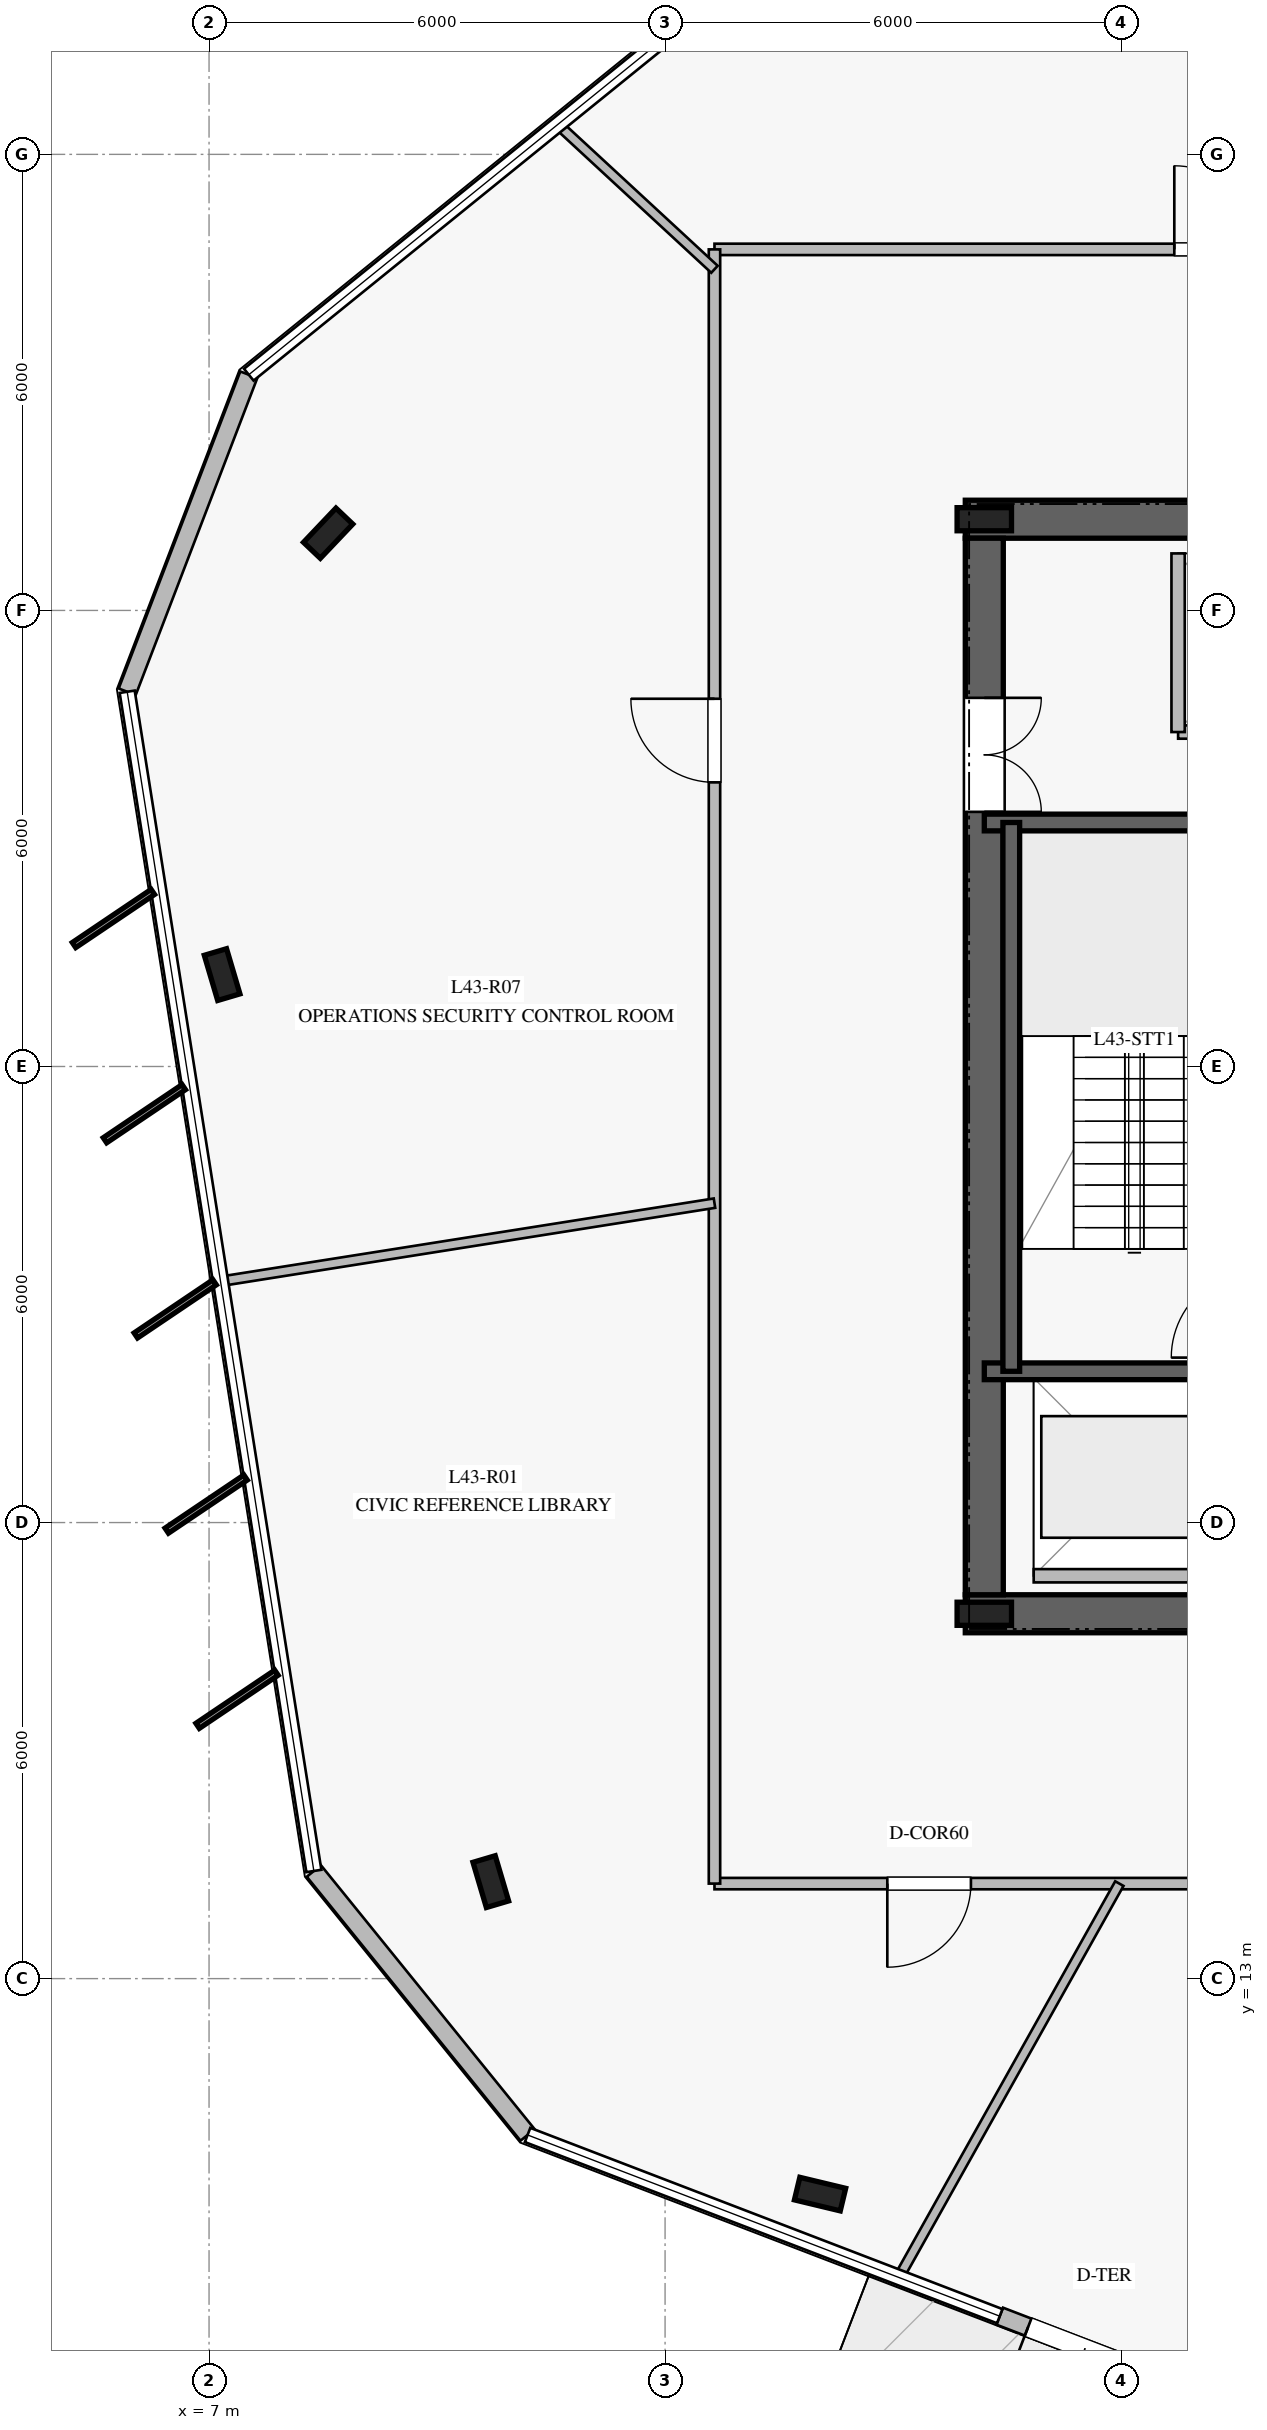
"""IFC4 building model, lengths in metres.
Left out: names, types, materials, properties, quantities, classifications, styles, units other than length and angle.
Written with IfcOpenShell. Run it as: python <this file> out.ifc"""

import sys

from ifc_helpers import new_model, si_unit, direction, frame, frame_2d, origin, origin_2d, place, context, subcontext, project, spatial, rectangle, i_section, extrude, element, fill, save


model = new_model("IFC4")
c1 = context("Model", 3, precision=1e-05, world=origin(), true_north=direction((0.0, 1.0)))
c2 = subcontext(c1, "Body", "Model", "MODEL_VIEW")
j1 = project(units=[si_unit("LENGTHUNIT", "METRE"), si_unit("PLANEANGLEUNIT", "RADIAN")], contexts=[c1])
p1 = place(None, origin())
s1 = spatial("IfcSite", under=j1, at=p1, CompositionType="ELEMENT")
p2 = place(p1, origin())
s2 = spatial("IfcBuilding", under=s1, at=p2, CompositionType="ELEMENT")
p3 = place(p2, frame((0.0, 0.0, 180.8)))
s3 = spatial("IfcBuildingStorey", under=s2, at=p3, CompositionType="ELEMENT", Elevation=180.8)
p4 = place(p3, frame((16.95, 17.8, 0.0), z_axis=(0.0, 0.0, 1.0), x_axis=(1.0, 0.0, 0.0)))
e1 = element("IfcWall", 1, at=p4, inside=s3, PredefinedType="SHEAR", context=c2, shape_type="SweptSolid", body=[
    extrude(rectangle(XDim=16.1, YDim=0.5, at=frame_2d((8.05, 0.0))), origin(), (0.0, 0.0, 1.0), 3.78),
])
p5 = place(p4, frame((5.0, 0.0, 0.0)))
e2 = element("IfcOpeningElement", 2, at=p5, cuts=e1, PredefinedType="OPENING", context=c2, shape_type="SweptSolid", body=[
    extrude(rectangle(XDim=1.2, YDim=2.25, at=frame_2d((0.6, 1.125))), frame((0.0, 0.26, 0.0), z_axis=(0.0, -1.0, 0.0), x_axis=(1.0, 0.0, 0.0)), (0.0, 0.0, 1.0), 0.52),
])
p6 = place(p4, frame((13.95, 0.0, 0.0)))
e3 = element("IfcOpeningElement", 3, at=p6, cuts=e1, PredefinedType="OPENING", context=c2, shape_type="SweptSolid", body=[
    extrude(rectangle(XDim=0.9, YDim=2.1, at=frame_2d((0.45, 1.05))), frame((0.0, 0.26, 0.0), z_axis=(0.0, -1.0, 0.0), x_axis=(1.0, 0.0, 0.0)), (0.0, 0.0, 1.0), 0.52),
])
p7 = place(p4, frame((9.2, 0.0, 0.0)))
e4 = element("IfcOpeningElement", 4, at=p7, cuts=e1, PredefinedType="OPENING", context=c2, shape_type="SweptSolid", body=[
    extrude(rectangle(XDim=1.1, YDim=2.2, at=frame_2d((0.55, 1.1))), frame((0.0, 0.26, 0.0), z_axis=(0.0, -1.0, 0.0), x_axis=(1.0, 0.0, 0.0)), (0.0, 0.0, 1.0), 0.52),
])
p8 = place(p3, frame((33.05, 32.2, 0.0), z_axis=(0.0, 0.0, 1.0), x_axis=(-1.0, 0.0, 0.0)))
e5 = element("IfcWall", 5, at=p8, inside=s3, PredefinedType="SHEAR", context=c2, shape_type="SweptSolid", body=[
    extrude(rectangle(XDim=16.1, YDim=0.5, at=frame_2d((8.05, 0.0))), origin(), (0.0, 0.0, 1.0), 3.78),
])
p9 = place(p8, frame((5.0, 0.0, 0.0)))
e6 = element("IfcOpeningElement", 6, at=p9, cuts=e5, PredefinedType="OPENING", context=c2, shape_type="SweptSolid", body=[
    extrude(rectangle(XDim=1.2, YDim=2.25, at=frame_2d((0.6, 1.125))), frame((0.0, 0.26, 0.0), z_axis=(0.0, -1.0, 0.0), x_axis=(1.0, 0.0, 0.0)), (0.0, 0.0, 1.0), 0.52),
])
p10 = place(p3, frame((17.2, 31.95, 0.0), z_axis=(0.0, 0.0, 1.0), x_axis=(0.0, -1.0, 0.0)))
e7 = element("IfcWall", 7, at=p10, inside=s3, PredefinedType="SHEAR", context=c2, shape_type="SweptSolid", body=[
    extrude(rectangle(XDim=13.9, YDim=0.5, at=frame_2d((6.95, 0.0))), origin(), (0.0, 0.0, 1.0), 3.78),
])
p11 = place(p10, frame((2.1, 0.0, 0.0)))
e8 = element("IfcOpeningElement", 8, at=p11, cuts=e7, PredefinedType="OPENING", context=c2, shape_type="SweptSolid", body=[
    extrude(rectangle(XDim=1.5, YDim=2.2, at=frame_2d((0.75, 1.1))), frame((0.0, 0.26, 0.0), z_axis=(0.0, -1.0, 0.0), x_axis=(1.0, 0.0, 0.0)), (0.0, 0.0, 1.0), 0.52),
])
for number, where, z_axis, x_axis in (
    (9, (17.2, 17.8, 0.0), (0.0, 0.0, 1.0), (1.0, 0.0, 0.0)),
    (10, (17.2, 32.2, 0.0), (0.0, 0.0, 1.0), (1.0, 0.0, 0.0)),
):
    element("IfcColumn", number, at=place(p3, frame(where, z_axis=z_axis, x_axis=x_axis)), inside=s3, PredefinedType="COLUMN", context=c2, shape_type="SweptSolid", body=[
        extrude(i_section(OverallWidth=0.304, OverallDepth=0.716, WebThickness=0.021, FlangeThickness=0.04, at=origin_2d()), origin(), (0.0, 0.0, 1.0), 4.0),
    ])
for number, where, z_axis, x_axis in (
    (11, (17.2, 20.99, 0.0), (0.0, 0.0, 1.0), (1.0, 0.0, 0.0)),
    (12, (17.2, 28.21, 0.0), (0.0, 0.0, 1.0), (1.0, 0.0, 0.0)),
):
    element("IfcWall", number, at=place(p3, frame(where, z_axis=z_axis, x_axis=x_axis)), inside=s3, PredefinedType="SOLIDWALL", context=c2, shape_type="SweptSolid", body=[
        extrude(rectangle(XDim=3.72, YDim=0.22, at=frame_2d((1.86, 0.0))), origin(), (0.0, 0.0, 1.0), 3.78),
    ])
p12 = place(p3, frame((17.555, 28.21, 0.0), z_axis=(0.0, 0.0, 1.0), x_axis=(0.0, -1.0, 0.0)))
e13 = element("IfcWall", 13, at=p12, inside=s3, PredefinedType="SOLIDWALL", context=c2, shape_type="SweptSolid", body=[
    extrude(rectangle(XDim=7.22, YDim=0.22, at=frame_2d((3.61, 0.0))), origin(), (0.0, 0.0, 1.0), 3.78),
])
for number, where, z_axis, x_axis in (
    (14, (8.567, 32.016, 0.0), (0.0, 0.0, 1.0), (0.688, 0.725, 0.0)),
    (15, (7.172, 26.209, 0.0), (0.0, 0.0, 1.0), (-0.284, 0.959, 0.0)),
    (16, (10.707, 14.276, 0.0), (0.0, 0.0, 1.0), (-0.284, 0.959, 0.0)),
    (17, (15.039, 10.165, 0.0), (0.0, 0.0, 1.0), (-0.972, 0.233, 0.0)),
):
    element("IfcColumn", number, at=place(p3, frame(where, z_axis=z_axis, x_axis=x_axis)), inside=s3, PredefinedType="COLUMN", context=c2, shape_type="SweptSolid", body=[
        extrude(i_section(OverallWidth=0.305, OverallDepth=0.62, WebThickness=0.021, FlangeThickness=0.04, at=origin_2d()), origin(), (0.0, 0.0, 1.0), 4.0),
    ])
p13 = place(p3, frame((7.523, 34.101, 0.0), z_axis=(0.0, 0.0, 1.0), x_axis=(-0.358114682982, -0.933677607011, 0.0)))
e18 = element("IfcWall", 18, at=p13, inside=s3, PredefinedType="STANDARD", context=c2, shape_type="SweptSolid", body=[
    extrude(rectangle(XDim=4.468, YDim=0.24, at=frame_2d((2.234, 0.0))), origin(), (0.0, 0.0, 1.0), 3.78),
])
p14 = place(p3, frame((8.379, 14.416, 0.0), z_axis=(0.0, 0.0, 1.0), x_axis=(0.629281524136, -0.777177433654, 0.0)))
e19 = element("IfcWall", 19, at=p14, inside=s3, PredefinedType="STANDARD", context=c2, shape_type="SweptSolid", body=[
    extrude(rectangle(XDim=4.469, YDim=0.24, at=frame_2d((2.234, 0.0))), origin(), (0.0, 0.0, 1.0), 3.78),
])
p15 = place(p3, frame((17.403, 8.559, 0.0), z_axis=(0.0, 0.0, 1.0), x_axis=(0.933544764029, -0.358460839638, 0.0)))
e20 = element("IfcWall", 20, at=p15, inside=s3, PredefinedType="STANDARD", context=c2, shape_type="SweptSolid", body=[
    extrude(rectangle(XDim=2.399, YDim=0.24, at=frame_2d((1.2, 0.0))), origin(), (0.0, 0.0, 1.0), 3.78),
])
p16 = place(p15, frame((0.4, 0.0, 0.0)))
e21 = element("IfcOpeningElement", 21, at=p16, cuts=e20, PredefinedType="OPENING", context=c2, shape_type="SweptSolid", body=[
    extrude(rectangle(XDim=1.6, YDim=2.25, at=frame_2d((0.8, 1.125))), frame((0.0, 0.13, 0.0), z_axis=(0.0, -1.0, 0.0), x_axis=(1.0, 0.0, 0.0)), (0.0, 0.0, 1.0), 0.26),
])
p17 = place(p3, frame((19.75, 29.4, 0.0), z_axis=(0.0, 0.0, 1.0), x_axis=(1.0, 0.0, 0.0)))
e22 = element("IfcWall", 22, at=p17, inside=s3, PredefinedType="PARTITIONING", context=c2, shape_type="SweptSolid", body=[
    extrude(rectangle(XDim=1.9, YDim=0.175, at=frame_2d((0.95, 0.0))), origin(), (0.0, 0.0, 1.0), 3.78),
])
p18 = place(p3, frame((19.75, 29.4, 0.0), z_axis=(0.0, 0.0, 1.0), x_axis=(0.0, 1.0, 0.0)))
e23 = element("IfcWall", 23, at=p18, inside=s3, PredefinedType="PARTITIONING", context=c2, shape_type="SweptSolid", body=[
    extrude(rectangle(XDim=2.35, YDim=0.175, at=frame_2d((1.175, 0.0))), origin(), (0.0, 0.0, 1.0), 3.78),
])
p19 = place(p3, frame((17.85, 18.3, 0.0), z_axis=(0.0, 0.0, 1.0), x_axis=(1.0, 0.0, 0.0)))
e24 = element("IfcWall", 24, at=p19, inside=s3, PredefinedType="PARTITIONING", context=c2, shape_type="SweptSolid", body=[
    extrude(rectangle(XDim=2.6, YDim=0.175, at=frame_2d((1.3, 0.0))), origin(), (0.0, 0.0, 1.0), 3.78),
])
p20 = place(p3, frame((13.65, 35.75, 0.0), z_axis=(0.0, 0.0, 1.0), x_axis=(1.0, 0.0, 0.0)))
e25 = element("IfcWall", 25, at=p20, inside=s3, PredefinedType="PARTITIONING", context=c2, shape_type="SweptSolid", body=[
    extrude(rectangle(XDim=22.7, YDim=0.15, at=frame_2d((11.35, 0.0))), origin(), (0.0, 0.0, 1.0), 3.05),
])
p21 = place(p20, frame((16.871, 0.0, 0.0)))
e26 = element("IfcOpeningElement", 26, at=p21, cuts=e25, PredefinedType="OPENING", context=c2, shape_type="SweptSolid", body=[
    extrude(rectangle(XDim=1.1, YDim=2.2, at=frame_2d((0.55, 1.1))), frame((0.0, 0.085, 0.0), z_axis=(0.0, -1.0, 0.0), x_axis=(1.0, 0.0, 0.0)), (0.0, 0.0, 1.0), 0.17),
])
p22 = place(p20, frame((6.05, 0.0, 0.0)))
e27 = element("IfcOpeningElement", 27, at=p22, cuts=e25, PredefinedType="OPENING", context=c2, shape_type="SweptSolid", body=[
    extrude(rectangle(XDim=1.1, YDim=2.2, at=frame_2d((0.55, 1.1))), frame((0.0, 0.085, 0.0), z_axis=(0.0, -1.0, 0.0), x_axis=(1.0, 0.0, 0.0)), (0.0, 0.0, 1.0), 0.17),
])
p23 = place(p3, frame((36.35, 14.25, 0.0), z_axis=(0.0, 0.0, 1.0), x_axis=(-1.0, 0.0, 0.0)))
e28 = element("IfcWall", 28, at=p23, inside=s3, PredefinedType="PARTITIONING", context=c2, shape_type="SweptSolid", body=[
    extrude(rectangle(XDim=22.7, YDim=0.15, at=frame_2d((11.35, 0.0))), origin(), (0.0, 0.0, 1.0), 3.05),
])
p24 = place(p23, frame((19.326, 0.0, 0.0)))
e29 = element("IfcOpeningElement", 29, at=p24, cuts=e28, PredefinedType="OPENING", context=c2, shape_type="SweptSolid", body=[
    extrude(rectangle(XDim=1.1, YDim=2.2, at=frame_2d((0.55, 1.1))), frame((0.0, 0.085, 0.0), z_axis=(0.0, -1.0, 0.0), x_axis=(1.0, 0.0, 0.0)), (0.0, 0.0, 1.0), 0.17),
])
p25 = place(p23, frame((10.613, 0.0, 0.0)))
e30 = element("IfcOpeningElement", 30, at=p25, cuts=e28, PredefinedType="OPENING", context=c2, shape_type="SweptSolid", body=[
    extrude(rectangle(XDim=1.1, YDim=2.2, at=frame_2d((0.55, 1.1))), frame((0.0, 0.085, 0.0), z_axis=(0.0, -1.0, 0.0), x_axis=(1.0, 0.0, 0.0)), (0.0, 0.0, 1.0), 0.17),
])
p26 = place(p3, frame((13.65, 14.25, 0.0), z_axis=(0.0, 0.0, 1.0), x_axis=(0.0, 1.0, 0.0)))
e31 = element("IfcWall", 31, at=p26, inside=s3, PredefinedType="PARTITIONING", context=c2, shape_type="SweptSolid", body=[
    extrude(rectangle(XDim=21.5, YDim=0.15, at=frame_2d((10.75, 0.0))), origin(), (0.0, 0.0, 1.0), 3.02),
])
p27 = place(p26, frame((14.488, 0.0, 0.0)))
e32 = element("IfcOpeningElement", 32, at=p27, cuts=e31, PredefinedType="OPENING", context=c2, shape_type="SweptSolid", body=[
    extrude(rectangle(XDim=1.1, YDim=2.2, at=frame_2d((0.55, 1.1))), frame((0.0, 0.085, 0.0), z_axis=(0.0, -1.0, 0.0), x_axis=(1.0, 0.0, 0.0)), (0.0, 0.0, 1.0), 0.17),
])
p28 = place(p3, frame((13.65, 35.488, 0.0), z_axis=(0.0, 0.0, 1.0), x_axis=(-0.7343000475, 0.678825043911, 0.0)))
e33 = element("IfcWall", 33, at=p28, inside=s3, PredefinedType="PARTITIONING", context=c2, shape_type="SweptSolid", body=[
    extrude(rectangle(XDim=2.79, YDim=0.125, at=frame_2d((1.395, 0.0))), origin(), (0.0, 0.0, 1.0), 3.18),
])
p29 = place(p3, frame((13.65, 23.202, 0.0), z_axis=(0.0, 0.0, 1.0), x_axis=(-0.987709828036, -0.156298738322, 0.0)))
e34 = element("IfcWall", 34, at=p29, inside=s3, PredefinedType="PARTITIONING", context=c2, shape_type="SweptSolid", body=[
    extrude(rectangle(XDim=6.563, YDim=0.125, at=frame_2d((3.282, 0.0))), origin(), (0.0, 0.0, 1.0), 3.02),
])
p30 = place(p3, frame((18.977, 14.25, 0.0), z_axis=(0.0, 0.0, 1.0), x_axis=(-0.488671153829, -0.872468052948, 0.0)))
e35 = element("IfcWall", 35, at=p30, inside=s3, PredefinedType="PARTITIONING", context=c2, shape_type="SweptSolid", body=[
    extrude(rectangle(XDim=5.922, YDim=0.125, at=frame_2d((2.961, 0.0))), origin(), (0.0, 0.0, 1.0), 3.05),
])
p31 = place(p16, frame((1.6, 0.0, 0.0), z_axis=(0.0, 0.0, 1.0), x_axis=(-1.0, 0.0, 0.0)))
e36 = element("IfcDoor", 36, at=p31, inside=s3, OperationType="DOUBLE_DOOR_SINGLE_SWING", PredefinedType="DOOR", context=c2, shape_type="SweptSolid", body=[
    extrude(rectangle(XDim=1.6, YDim=2.25, at=frame_2d((0.8, 1.125))), frame((0.0, 0.025, 0.0), z_axis=(0.0, -1.0, 0.0), x_axis=(1.0, 0.0, 0.0)), (0.0, 0.0, 1.0), 0.05),
])
fill(e21, e36)
p32 = place(p11, origin())
e37 = element("IfcDoor", 37, at=p32, inside=s3, OperationType="DOUBLE_DOOR_SINGLE_SWING", PredefinedType="DOOR", context=c2, shape_type="SweptSolid", body=[
    extrude(rectangle(XDim=1.5, YDim=2.2, at=frame_2d((0.75, 1.1))), frame((0.0, 0.025, 0.0), z_axis=(0.0, -1.0, 0.0), x_axis=(1.0, 0.0, 0.0)), (0.0, 0.0, 1.0), 0.05),
])
fill(e8, e37)
p33 = place(p24, origin())
e38 = element("IfcDoor", 38, at=p33, inside=s3, OperationType="SINGLE_SWING_RIGHT", PredefinedType="DOOR", context=c2, shape_type="SweptSolid", body=[
    extrude(rectangle(XDim=1.1, YDim=2.2, at=frame_2d((0.55, 1.1))), frame((0.0, 0.025, 0.0), z_axis=(0.0, -1.0, 0.0), x_axis=(1.0, 0.0, 0.0)), (0.0, 0.0, 1.0), 0.05),
])
fill(e29, e38)
p34 = place(p22, origin())
e39 = element("IfcDoor", 39, at=p34, inside=s3, OperationType="SINGLE_SWING_LEFT", PredefinedType="DOOR", context=c2, shape_type="SweptSolid", body=[
    extrude(rectangle(XDim=1.1, YDim=2.2, at=frame_2d((0.55, 1.1))), frame((0.0, 0.025, 0.0), z_axis=(0.0, -1.0, 0.0), x_axis=(1.0, 0.0, 0.0)), (0.0, 0.0, 1.0), 0.05),
])
fill(e27, e39)
p35 = place(p27, origin())
e40 = element("IfcDoor", 40, at=p35, inside=s3, OperationType="SINGLE_SWING_RIGHT", PredefinedType="DOOR", context=c2, shape_type="SweptSolid", body=[
    extrude(rectangle(XDim=1.1, YDim=2.2, at=frame_2d((0.55, 1.1))), frame((0.0, 0.025, 0.0), z_axis=(0.0, -1.0, 0.0), x_axis=(1.0, 0.0, 0.0)), (0.0, 0.0, 1.0), 0.05),
])
fill(e32, e40)
save(model, sys.argv[1])
